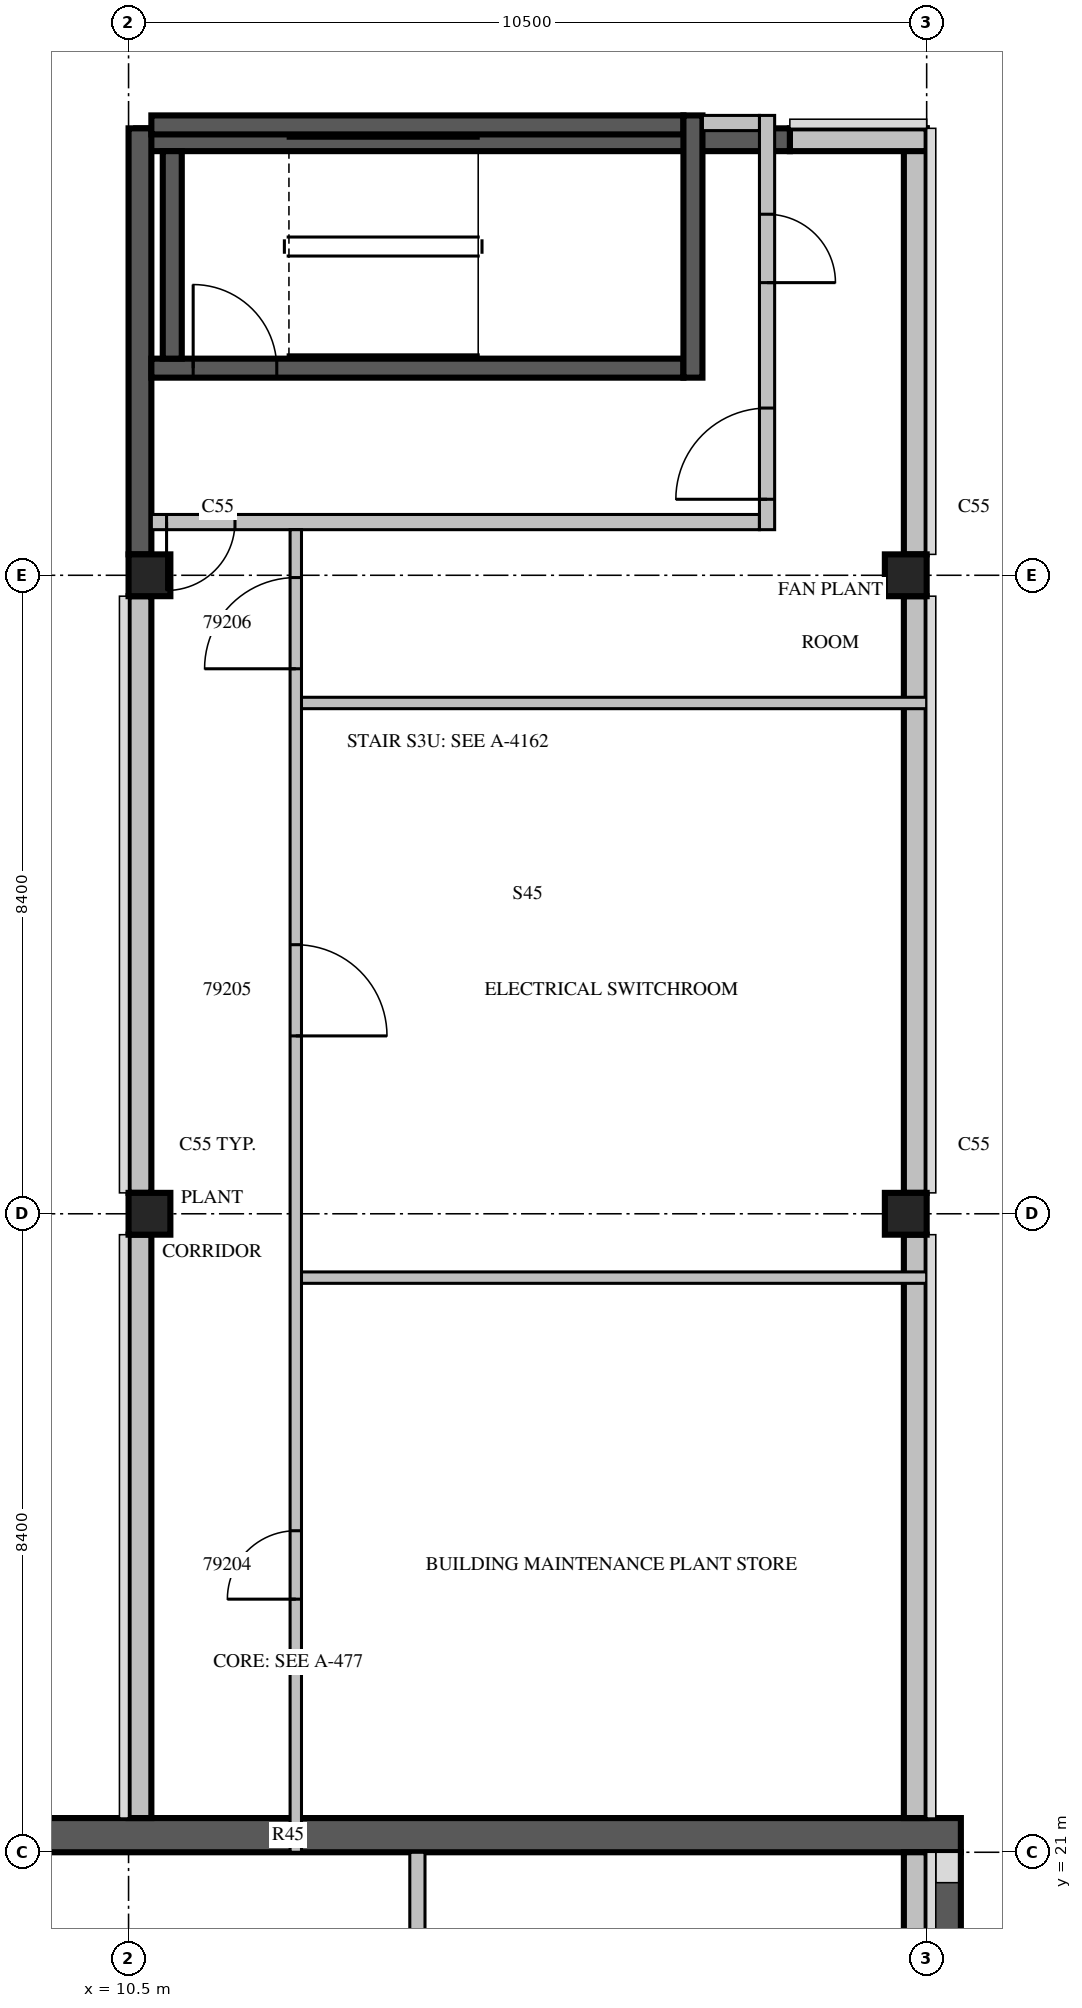
"""IFC4 building model, lengths in metres.
Left out: names, types, materials, properties, quantities, classifications, styles, units other than length and angle.
Written with IfcOpenShell. Run it as: python <this file> out.ifc"""

import sys

from ifc_helpers import new_model, si_unit, direction, frame, frame_2d, origin, origin_2d, place, context, subcontext, project, spatial, rectangle, extrude, source, transform, mapped, element, fill, save


model = new_model("IFC4")
c1 = context("Model", 3, precision=1e-05, world=origin(), true_north=direction((0.0, 1.0)))
c2 = subcontext(c1, "Body", "Model", "MODEL_VIEW")
j1 = project(units=[si_unit("LENGTHUNIT", "METRE"), si_unit("PLANEANGLEUNIT", "RADIAN")], contexts=[c1])
p1 = place(None, origin())
s1 = spatial("IfcSite", under=j1, at=p1, CompositionType="ELEMENT")
p2 = place(p1, origin())
s2 = spatial("IfcBuilding", under=s1, at=p2, CompositionType="ELEMENT")
p3 = place(p2, frame((0.0, 0.0, 372.5)))
s3 = spatial("IfcBuildingStorey", under=s2, at=p3, CompositionType="ELEMENT", Elevation=372.5)
m1 = source(origin(), c2, "Body", "SweptSolid", [
    extrude(rectangle(XDim=0.55, YDim=0.55, at=origin_2d()), origin(), (0.0, 0.0, 1.0), 4.0),
])
for number, where, z_axis, x_axis in (
    (1, (10.775, 29.4, 0.0), (0.0, 0.0, 1.0), (1.0, 0.0, 0.0)),
    (2, (20.725, 29.4, 0.0), (0.0, 0.0, 1.0), (1.0, 0.0, 0.0)),
    (3, (10.775, 37.8, 0.0), (0.0, 0.0, 1.0), (1.0, 0.0, 0.0)),
    (4, (20.725, 37.8, 0.0), (0.0, 0.0, 1.0), (1.0, 0.0, 0.0)),
):
    element("IfcColumn", number, at=place(p3, frame(where, z_axis=z_axis, x_axis=x_axis)), inside=s3, PredefinedType="COLUMN", context=c2, shape_type="MappedRepresentation", body=[
        mapped(m1, transform((0.0, 0.0, 0.0), scale=1.0)),
    ])
m2 = source(origin(), c2, "Body", "SweptSolid", [
    extrude(rectangle(XDim=17.25, YDim=0.45, at=frame_2d((8.625, 0.0))), origin(), (0.0, 0.0, 1.0), 3.55),
])
p4 = place(p3, frame((4.2, 21.225, 0.0), z_axis=(0.0, 0.0, 1.0), x_axis=(1.0, 0.0, 0.0)))
e5 = element("IfcWall", 5, at=p4, inside=s3, PredefinedType="SOLIDWALL", context=c2, shape_type="MappedRepresentation", body=[
    mapped(m2, transform((0.0, 0.0, 0.0), scale=1.0)),
])
p5 = place(p3, frame((21.225, 4.2, 0.0), z_axis=(0.0, 0.0, 1.0), x_axis=(0.0, 1.0, 0.0)))
e6 = element("IfcWall", 6, at=p5, inside=s3, PredefinedType="SOLIDWALL", context=c2, shape_type="SweptSolid", body=[
    extrude(rectangle(XDim=16.8, YDim=0.45, at=frame_2d((8.4, 0.0))), origin(), (0.0, 0.0, 1.0), 3.55),
])
m3 = source(origin(), c2, "Body", "SweptSolid", [
    extrude(rectangle(XDim=10.5, YDim=0.3, at=frame_2d((5.25, 0.0))), origin(), (0.0, 0.0, 1.0), 3.55),
])
p6 = place(p3, frame((20.85, 10.5, 0.0), z_axis=(0.0, 0.0, 1.0), x_axis=(0.0, 1.0, 0.0)))
e7 = element("IfcWall", 7, at=p6, inside=s3, PredefinedType="STANDARD", context=c2, shape_type="MappedRepresentation", body=[
    mapped(m3, transform((0.0, 0.0, 0.0), scale=1.0)),
])
m4 = source(origin(), c2, "Body", "SweptSolid", [
    extrude(rectangle(XDim=7.675, YDim=0.3, at=frame_2d((3.837, 0.0))), origin(), (0.0, 0.0, 1.0), 3.55),
])
p7 = place(p3, frame((20.85, 21.45, 0.0), z_axis=(0.0, 0.0, 1.0), x_axis=(0.0, 1.0, 0.0)))
e8 = element("IfcWall", 8, at=p7, inside=s3, PredefinedType="STANDARD", context=c2, shape_type="MappedRepresentation", body=[
    mapped(m4, transform((0.0, 0.0, 0.0), scale=1.0)),
])
m5 = source(origin(), c2, "Body", "SweptSolid", [
    extrude(rectangle(XDim=7.85, YDim=0.3, at=frame_2d((3.925, 0.0))), origin(), (0.0, 0.0, 1.0), 3.55),
])
p8 = place(p3, frame((20.85, 29.675, 0.0), z_axis=(0.0, 0.0, 1.0), x_axis=(0.0, 1.0, 0.0)))
e9 = element("IfcWall", 9, at=p8, inside=s3, PredefinedType="STANDARD", context=c2, shape_type="MappedRepresentation", body=[
    mapped(m5, transform((0.0, 0.0, 0.0), scale=1.0)),
])
p9 = place(p3, frame((20.85, 38.075, 0.0), z_axis=(0.0, 0.0, 1.0), x_axis=(0.0, 1.0, 0.0)))
e10 = element("IfcWall", 10, at=p9, inside=s3, PredefinedType="STANDARD", context=c2, shape_type="SweptSolid", body=[
    extrude(rectangle(XDim=5.605, YDim=0.3, at=frame_2d((2.803, 0.0))), origin(), (0.0, 0.0, 1.0), 3.55),
])
p10 = place(p3, frame((21.0, 43.53, 0.0), z_axis=(0.0, 0.0, 1.0), x_axis=(-1.0, 0.0, 0.0)))
e11 = element("IfcWall", 11, at=p10, inside=s3, PredefinedType="STANDARD", context=c2, shape_type="SweptSolid", body=[
    extrude(rectangle(XDim=1.8, YDim=0.3, at=frame_2d((0.9, 0.0))), origin(), (0.0, 0.0, 1.0), 3.55),
])
p11 = place(p3, frame((19.2, 43.53, 0.0), z_axis=(0.0, 0.0, 1.0), x_axis=(-1.0, 0.0, 0.0)))
e12 = element("IfcWall", 12, at=p11, inside=s3, PredefinedType="SOLIDWALL", context=c2, shape_type="SweptSolid", body=[
    extrude(rectangle(XDim=8.6, YDim=0.3, at=frame_2d((4.3, 0.0))), origin(), (0.0, 0.0, 1.0), 3.55),
])
p12 = place(p3, frame((10.65, 43.68, 0.0), z_axis=(0.0, 0.0, 1.0), x_axis=(0.0, -1.0, 0.0)))
e13 = element("IfcWall", 13, at=p12, inside=s3, PredefinedType="SOLIDWALL", context=c2, shape_type="SweptSolid", body=[
    extrude(rectangle(XDim=5.605, YDim=0.3, at=frame_2d((2.803, 0.0))), origin(), (0.0, 0.0, 1.0), 3.55),
])
p13 = place(p3, frame((10.65, 37.525, 0.0), z_axis=(0.0, 0.0, 1.0), x_axis=(0.0, -1.0, 0.0)))
e14 = element("IfcWall", 14, at=p13, inside=s3, PredefinedType="STANDARD", context=c2, shape_type="MappedRepresentation", body=[
    mapped(m5, transform((0.0, 0.0, 0.0), scale=1.0)),
])
p14 = place(p3, frame((10.65, 29.125, 0.0), z_axis=(0.0, 0.0, 1.0), x_axis=(0.0, -1.0, 0.0)))
e15 = element("IfcWall", 15, at=p14, inside=s3, PredefinedType="STANDARD", context=c2, shape_type="MappedRepresentation", body=[
    mapped(m4, transform((0.0, 0.0, 0.0), scale=1.0)),
])
m6 = source(origin(), c2, "Body", "SweptSolid", [
    extrude(rectangle(XDim=7.0, YDim=0.25, at=frame_2d((3.5, 0.0))), origin(), (0.0, 0.0, 1.0), 3.55),
])
p15 = place(p3, frame((10.8, 40.525, 0.0), z_axis=(0.0, 0.0, 1.0), x_axis=(1.0, 0.0, 0.0)))
e16 = element("IfcWall", 16, at=p15, inside=s3, PredefinedType="SOLIDWALL", context=c2, shape_type="MappedRepresentation", body=[
    mapped(m6, transform((0.0, 0.0, 0.0), scale=1.0)),
])
m7 = source(origin(), c2, "Body", "SweptSolid", [
    extrude(rectangle(XDim=1.1, YDim=2.1, at=frame_2d((0.55, 1.05))), frame((0.0, 0.135, 0.0), z_axis=(0.0, -1.0, 0.0), x_axis=(1.0, 0.0, 0.0)), (0.0, 0.0, 1.0), 0.27),
])
p16 = place(p15, frame((0.55, 0.0, 0.0)))
e17 = element("IfcOpeningElement", 17, at=p16, cuts=e16, PredefinedType="OPENING", context=c2, shape_type="MappedRepresentation", body=[
    mapped(m7, transform((0.0, 0.0, 0.0), scale=1.0)),
])
p17 = place(p3, frame((10.8, 43.725, 0.0), z_axis=(0.0, 0.0, 1.0), x_axis=(1.0, 0.0, 0.0)))
e18 = element("IfcWall", 18, at=p17, inside=s3, PredefinedType="SOLIDWALL", context=c2, shape_type="MappedRepresentation", body=[
    mapped(m6, transform((0.0, 0.0, 0.0), scale=1.0)),
])
m8 = source(origin(), c2, "Body", "SweptSolid", [
    extrude(rectangle(XDim=3.45, YDim=0.25, at=frame_2d((1.725, 0.0))), origin(), (0.0, 0.0, 1.0), 3.55),
])
p18 = place(p3, frame((17.925, 40.4, 0.0), z_axis=(0.0, 0.0, 1.0), x_axis=(0.0, 1.0, 0.0)))
e19 = element("IfcWall", 19, at=p18, inside=s3, PredefinedType="SOLIDWALL", context=c2, shape_type="MappedRepresentation", body=[
    mapped(m8, transform((0.0, 0.0, 0.0), scale=1.0)),
])
m9 = source(origin(), c2, "Body", "SweptSolid", [
    extrude(rectangle(XDim=2.73, YDim=0.25, at=frame_2d((1.365, 0.0))), origin(), (0.0, 0.0, 1.0), 3.55),
])
p19 = place(p3, frame((11.075, 40.65, 0.0), z_axis=(0.0, 0.0, 1.0), x_axis=(0.0, 1.0, 0.0)))
e20 = element("IfcWall", 20, at=p19, inside=s3, PredefinedType="SOLIDWALL", context=c2, shape_type="MappedRepresentation", body=[
    mapped(m9, transform((0.0, 0.0, 0.0), scale=1.0)),
])
m10 = source(origin(), c2, "Body", "SweptSolid", [
    extrude(rectangle(XDim=8.0, YDim=0.2, at=frame_2d((4.0, 0.0))), origin(), (0.0, 0.0, 1.0), 3.55),
])
p20 = place(p3, frame((10.8, 38.5, 0.0), z_axis=(0.0, 0.0, 1.0), x_axis=(1.0, 0.0, 0.0)))
e21 = element("IfcWall", 21, at=p20, inside=s3, PredefinedType="PARTITIONING", context=c2, shape_type="MappedRepresentation", body=[
    mapped(m10, transform((0.0, 0.0, 0.0), scale=1.0)),
])
m11 = source(origin(), c2, "Body", "SweptSolid", [
    extrude(rectangle(XDim=0.9, YDim=2.1, at=frame_2d((0.45, 1.05))), frame((0.0, 0.11, 0.0), z_axis=(0.0, -1.0, 0.0), x_axis=(1.0, 0.0, 0.0)), (0.0, 0.0, 1.0), 0.22),
])
p21 = place(p20, frame((0.2, 0.0, 0.0)))
e22 = element("IfcOpeningElement", 22, at=p21, cuts=e21, PredefinedType="OPENING", context=c2, shape_type="MappedRepresentation", body=[
    mapped(m11, transform((0.0, 0.0, 0.0), scale=1.0)),
])
m12 = source(origin(), c2, "Body", "SweptSolid", [
    extrude(rectangle(XDim=5.45, YDim=0.2, at=frame_2d((2.725, 0.0))), origin(), (0.0, 0.0, 1.0), 3.55),
])
p22 = place(p3, frame((18.9, 38.4, 0.0), z_axis=(0.0, 0.0, 1.0), x_axis=(0.0, 1.0, 0.0)))
e23 = element("IfcWall", 23, at=p22, inside=s3, PredefinedType="PARTITIONING", context=c2, shape_type="MappedRepresentation", body=[
    mapped(m12, transform((0.0, 0.0, 0.0), scale=1.0)),
])
m13 = source(origin(), c2, "Body", "SweptSolid", [
    extrude(rectangle(XDim=1.2, YDim=2.1, at=frame_2d((0.6, 1.05))), frame((0.0, 0.11, 0.0), z_axis=(0.0, -1.0, 0.0), x_axis=(1.0, 0.0, 0.0)), (0.0, 0.0, 1.0), 0.22),
])
p23 = place(p22, frame((0.4, 0.0, 0.0)))
e24 = element("IfcOpeningElement", 24, at=p23, cuts=e23, PredefinedType="OPENING", context=c2, shape_type="MappedRepresentation", body=[
    mapped(m13, transform((0.0, 0.0, 0.0), scale=1.0)),
])
p24 = place(p22, frame((3.25, 0.0, 0.0)))
e25 = element("IfcOpeningElement", 25, at=p24, cuts=e23, PredefinedType="OPENING", context=c2, shape_type="MappedRepresentation", body=[
    mapped(m11, transform((0.0, 0.0, 0.0), scale=1.0)),
])
m14 = source(origin(), c2, "Body", "SweptSolid", [
    extrude(rectangle(XDim=0.75, YDim=0.2, at=frame_2d((0.375, 0.0))), origin(), (0.0, 0.0, 1.0), 3.55),
])
p25 = place(p3, frame((18.05, 43.75, 0.0), z_axis=(0.0, 0.0, 1.0), x_axis=(1.0, 0.0, 0.0)))
e26 = element("IfcWall", 26, at=p25, inside=s3, PredefinedType="PARTITIONING", context=c2, shape_type="MappedRepresentation", body=[
    mapped(m14, transform((0.0, 0.0, 0.0), scale=1.0)),
])
p26 = place(p3, frame((14.3, 17.1, 0.0), z_axis=(0.0, 0.0, 1.0), x_axis=(0.0, 1.0, 0.0)))
e27 = element("IfcWall", 27, at=p26, inside=s3, PredefinedType="PARTITIONING", context=c2, shape_type="SweptSolid", body=[
    extrude(rectangle(XDim=3.9, YDim=0.2, at=frame_2d((1.95, 0.0))), origin(), (0.0, 0.0, 1.0), 3.55),
])
p27 = place(p3, frame((12.7, 28.56, 0.0), z_axis=(0.0, 0.0, 1.0), x_axis=(1.0, 0.0, 0.0)))
e28 = element("IfcWall", 28, at=p27, inside=s3, PredefinedType="PARTITIONING", context=c2, shape_type="SweptSolid", body=[
    extrude(rectangle(XDim=8.3, YDim=0.15, at=frame_2d((4.15, 0.0))), origin(), (0.0, 0.0, 1.0), 3.55),
])
m15 = source(origin(), c2, "Body", "SweptSolid", [
    extrude(rectangle(XDim=8.3, YDim=0.15, at=frame_2d((4.15, 0.0))), origin(), (0.0, 0.0, 1.0), 3.55),
])
p28 = place(p3, frame((12.7, 36.12, 0.0), z_axis=(0.0, 0.0, 1.0), x_axis=(1.0, 0.0, 0.0)))
e29 = element("IfcWall", 29, at=p28, inside=s3, PredefinedType="PARTITIONING", context=c2, shape_type="MappedRepresentation", body=[
    mapped(m15, transform((0.0, 0.0, 0.0), scale=1.0)),
])
m16 = source(origin(), c2, "Body", "SweptSolid", [
    extrude(rectangle(XDim=17.4, YDim=0.15, at=frame_2d((8.7, 0.0))), origin(), (0.0, 0.0, 1.0), 3.55),
])
p29 = place(p3, frame((12.7, 21.0, 0.0), z_axis=(0.0, 0.0, 1.0), x_axis=(0.0, 1.0, 0.0)))
e30 = element("IfcWall", 30, at=p29, inside=s3, PredefinedType="PARTITIONING", context=c2, shape_type="MappedRepresentation", body=[
    mapped(m16, transform((0.0, 0.0, 0.0), scale=1.0)),
])
m17 = source(origin(), c2, "Body", "SweptSolid", [
    extrude(rectangle(XDim=0.9, YDim=2.1, at=frame_2d((0.45, 1.05))), frame((0.0, 0.085, 0.0), z_axis=(0.0, -1.0, 0.0), x_axis=(1.0, 0.0, 0.0)), (0.0, 0.0, 1.0), 0.17),
])
p30 = place(p29, frame((3.33, 0.0, 0.0)))
e31 = element("IfcOpeningElement", 31, at=p30, cuts=e30, PredefinedType="OPENING", context=c2, shape_type="MappedRepresentation", body=[
    mapped(m17, transform((0.0, 0.0, 0.0), scale=1.0)),
])
m18 = source(origin(), c2, "Body", "SweptSolid", [
    extrude(rectangle(XDim=1.2, YDim=2.1, at=frame_2d((0.6, 1.05))), frame((0.0, 0.085, 0.0), z_axis=(0.0, -1.0, 0.0), x_axis=(1.0, 0.0, 0.0)), (0.0, 0.0, 1.0), 0.17),
])
p31 = place(p29, frame((10.74, 0.0, 0.0)))
e32 = element("IfcOpeningElement", 32, at=p31, cuts=e30, PredefinedType="OPENING", context=c2, shape_type="MappedRepresentation", body=[
    mapped(m18, transform((0.0, 0.0, 0.0), scale=1.0)),
])
p32 = place(p29, frame((15.57, 0.0, 0.0)))
e33 = element("IfcOpeningElement", 33, at=p32, cuts=e30, PredefinedType="OPENING", context=c2, shape_type="MappedRepresentation", body=[
    mapped(m18, transform((0.0, 0.0, 0.0), scale=1.0)),
])
m19 = source(origin(), c2, "Body", "SweptSolid", [
    extrude(rectangle(XDim=1.1, YDim=2.1, at=frame_2d((0.55, 1.05))), frame((0.0, 0.025, 0.0), z_axis=(0.0, -1.0, 0.0), x_axis=(1.0, 0.0, 0.0)), (0.0, 0.0, 1.0), 0.05),
])
p33 = place(p16, origin())
e34 = element("IfcDoor", 34, at=p33, inside=s3, OperationType="SINGLE_SWING_LEFT", PredefinedType="DOOR", context=c2, shape_type="MappedRepresentation", body=[
    mapped(m19, transform((0.0, 0.0, 0.0), scale=1.0)),
])
fill(e17, e34)
m20 = source(origin(), c2, "Body", "SweptSolid", [
    extrude(rectangle(XDim=0.9, YDim=2.1, at=frame_2d((0.45, 1.05))), frame((0.0, 0.025, 0.0), z_axis=(0.0, -1.0, 0.0), x_axis=(1.0, 0.0, 0.0)), (0.0, 0.0, 1.0), 0.05),
])
p34 = place(p21, origin())
e35 = element("IfcDoor", 35, at=p34, inside=s3, OperationType="SINGLE_SWING_RIGHT", PredefinedType="DOOR", context=c2, shape_type="MappedRepresentation", body=[
    mapped(m20, transform((0.0, 0.0, 0.0), scale=1.0)),
])
fill(e22, e35)
m21 = source(origin(), c2, "Body", "SweptSolid", [
    extrude(rectangle(XDim=1.2, YDim=2.1, at=frame_2d((0.6, 1.05))), frame((0.0, 0.025, 0.0), z_axis=(0.0, -1.0, 0.0), x_axis=(1.0, 0.0, 0.0)), (0.0, 0.0, 1.0), 0.05),
])
p35 = place(p23, origin())
e36 = element("IfcDoor", 36, at=p35, inside=s3, OperationType="SINGLE_SWING_LEFT", PredefinedType="DOOR", context=c2, shape_type="MappedRepresentation", body=[
    mapped(m21, transform((0.0, 0.0, 0.0), scale=1.0)),
])
fill(e24, e36)
p36 = place(p24, origin())
e37 = element("IfcDoor", 37, at=p36, inside=s3, OperationType="SINGLE_SWING_RIGHT", PredefinedType="DOOR", context=c2, shape_type="MappedRepresentation", body=[
    mapped(m20, transform((0.0, 0.0, 0.0), scale=1.0)),
])
fill(e25, e37)
p37 = place(p30, origin())
e38 = element("IfcDoor", 38, at=p37, inside=s3, OperationType="SINGLE_SWING_LEFT", PredefinedType="DOOR", context=c2, shape_type="MappedRepresentation", body=[
    mapped(m20, transform((0.0, 0.0, 0.0), scale=1.0)),
])
fill(e31, e38)
p38 = place(p31, origin())
e39 = element("IfcDoor", 39, at=p38, inside=s3, OperationType="SINGLE_SWING_RIGHT", PredefinedType="DOOR", context=c2, shape_type="MappedRepresentation", body=[
    mapped(m21, transform((0.0, 0.0, 0.0), scale=1.0)),
])
fill(e32, e39)
p39 = place(p32, origin())
e40 = element("IfcDoor", 40, at=p39, inside=s3, OperationType="SINGLE_SWING_LEFT", PredefinedType="DOOR", context=c2, shape_type="MappedRepresentation", body=[
    mapped(m21, transform((0.0, 0.0, 0.0), scale=1.0)),
])
fill(e33, e40)
save(model, sys.argv[1])
